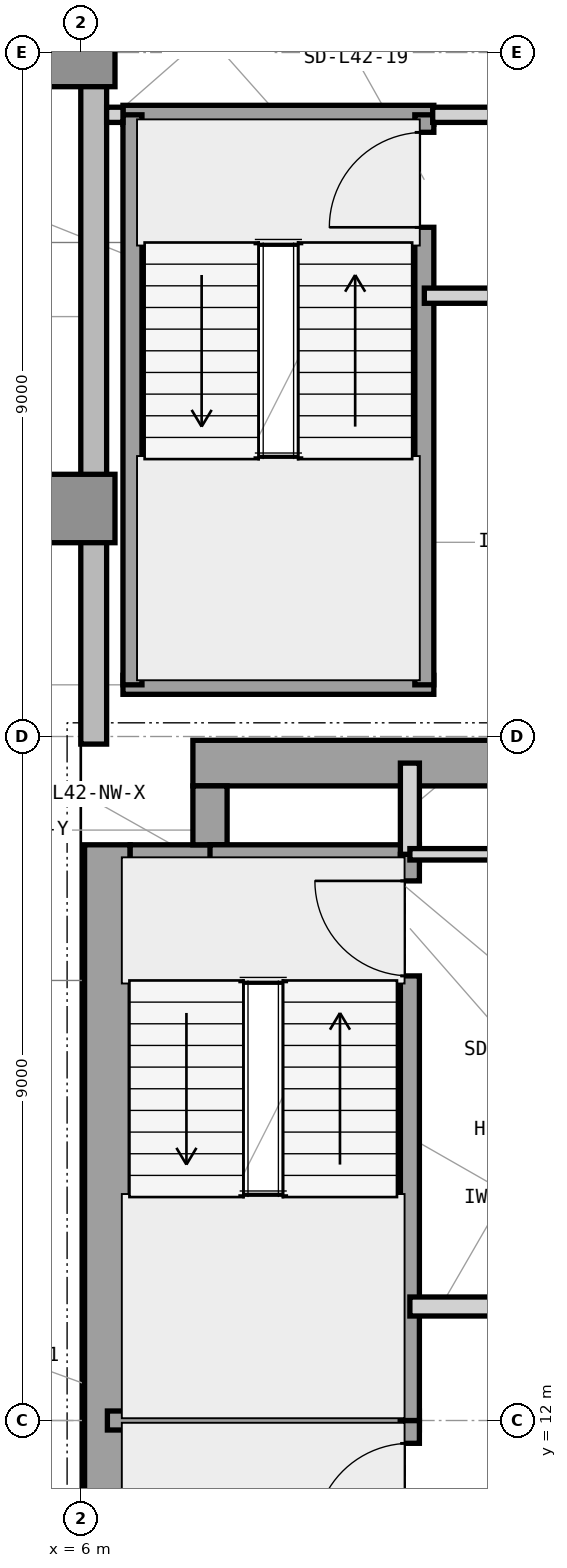
"""IFC4 building model, lengths in metres.
Left out: names, types, materials, properties, quantities, classifications, styles, units other than length and angle.
Written with IfcOpenShell. Run it as: python <this file> out.ifc"""

import sys

from ifc_helpers import new_model, si_unit, direction, frame, frame_2d, origin, origin_2d, place, context, subcontext, project, spatial, rectangle, extrude, element, fill, save


model = new_model("IFC4")
c1 = context("Model", 3, precision=1e-05, world=origin(), true_north=direction((0.0, 1.0)))
c2 = subcontext(c1, "Body", "Model", "MODEL_VIEW")
j1 = project(units=[si_unit("LENGTHUNIT", "METRE"), si_unit("PLANEANGLEUNIT", "RADIAN")], contexts=[c1])
p1 = place(None, origin())
s1 = spatial("IfcSite", under=j1, at=p1, CompositionType="ELEMENT")
p2 = place(p1, origin())
s2 = spatial("IfcBuilding", under=s1, at=p2, CompositionType="ELEMENT")
p3 = place(p2, frame((0.0, 0.0, 176.1)))
s3 = spatial("IfcBuildingStorey", under=s2, at=p3, CompositionType="ELEMENT", Elevation=176.1)
p4 = place(p3, frame((6.35, 4.425, 0.0), z_axis=(0.0, 0.0, 1.0), x_axis=(0.0, 1.0, 0.0)))
e1 = element("IfcWall", 1, at=p4, inside=s3, PredefinedType="SHEAR", context=c2, shape_type="SweptSolid", body=[
    extrude(rectangle(XDim=15.15, YDim=0.6, at=frame_2d((7.575, 0.0))), origin(), (0.0, 0.0, 1.0), 3.9),
])
p5 = place(p3, frame((7.475, 20.65, 0.0), z_axis=(0.0, 0.0, 1.0), x_axis=(1.0, 0.0, 0.0)))
e2 = element("IfcWall", 2, at=p5, inside=s3, PredefinedType="SHEAR", context=c2, shape_type="SweptSolid", body=[
    extrude(rectangle(XDim=12.325, YDim=0.6, at=frame_2d((6.163, 0.0))), origin(), (0.0, 0.0, 1.0), 3.9),
])
p6 = place(p3, frame((6.65, 19.35, 0.0), z_axis=(0.0, 0.0, 1.0), x_axis=(1.0, 0.0, 0.0)))
e3 = element("IfcWall", 3, at=p6, inside=s3, PredefinedType="SHEAR", context=c2, shape_type="SweptSolid", body=[
    extrude(rectangle(XDim=1.275, YDim=0.45, at=frame_2d((0.638, 0.0))), origin(), (0.0, 0.0, 1.0), 3.9),
])
p7 = place(p3, frame((7.7, 19.575, 0.0), z_axis=(0.0, 0.0, 1.0), x_axis=(0.0, 1.0, 0.0)))
e4 = element("IfcWall", 4, at=p7, inside=s3, PredefinedType="SHEAR", context=c2, shape_type="SweptSolid", body=[
    extrude(rectangle(XDim=0.775, YDim=0.45, at=frame_2d((0.388, 0.0))), origin(), (0.0, 0.0, 1.0), 3.9),
])
for number, where, z_axis, x_axis in (
    (5, (6.0, 24.0, 0.0), (0.0, 0.0, 1.0), (1.0, 0.0, 0.0)),
    (6, (6.0, 30.0, 0.0), (0.0, 0.0, 1.0), (1.0, 0.0, 0.0)),
):
    element("IfcColumn", number, at=place(p3, frame(where, z_axis=z_axis, x_axis=x_axis)), inside=s3, PredefinedType="COLUMN", context=c2, shape_type="SweptSolid", body=[
        extrude(rectangle(XDim=0.9, YDim=0.9, at=origin_2d()), origin(), (0.0, 0.0, 1.0), 3.9),
    ])
p8 = place(p3, frame((6.17, 43.4, 0.0), z_axis=(0.0, 0.0, 1.0), x_axis=(0.0, -1.0, 0.0)))
e7 = element("IfcWall", 7, at=p8, inside=s3, PredefinedType="STANDARD", context=c2, shape_type="SweptSolid", body=[
    extrude(rectangle(XDim=22.5, YDim=0.34, at=frame_2d((11.25, 0.0))), origin(), (0.0, 0.0, 1.0), 3.7),
])
p9 = place(p8, frame((10.1, 0.0, 0.9)))
e8 = element("IfcOpeningElement", 8, at=p9, cuts=e7, PredefinedType="OPENING", context=c2, shape_type="SweptSolid", body=[
    extrude(rectangle(XDim=2.3, YDim=2.2, at=frame_2d((1.15, 1.1))), frame((0.0, 0.18, 0.0), z_axis=(0.0, -1.0, 0.0), x_axis=(1.0, 0.0, 0.0)), (0.0, 0.0, 1.0), 0.36),
])
p10 = place(p8, frame((5.425, 0.0, 0.9)))
e9 = element("IfcOpeningElement", 9, at=p10, cuts=e7, PredefinedType="OPENING", context=c2, shape_type="SweptSolid", body=[
    extrude(rectangle(XDim=1.2, YDim=2.2, at=frame_2d((0.6, 1.1))), frame((0.0, 0.18, 0.0), z_axis=(0.0, -1.0, 0.0), x_axis=(1.0, 0.0, 0.0)), (0.0, 0.0, 1.0), 0.36),
])
p11 = place(p3, frame((6.35, 12.0, 0.0), z_axis=(0.0, 0.0, 1.0), x_axis=(1.0, 0.0, 0.0)))
e10 = element("IfcWall", 10, at=p11, inside=s3, PredefinedType="SHEAR", context=c2, shape_type="SweptSolid", body=[
    extrude(rectangle(XDim=4.105, YDim=0.25, at=frame_2d((2.052, 0.0))), origin(), (0.0, 0.0, 1.0), 3.9),
])
p12 = place(p3, frame((7.7, 19.45, 0.0), z_axis=(0.0, 0.0, 1.0), x_axis=(1.0, 0.0, 0.0)))
e11 = element("IfcWall", 11, at=p12, inside=s3, PredefinedType="SHEAR", context=c2, shape_type="SweptSolid", body=[
    extrude(rectangle(XDim=2.755, YDim=0.25, at=frame_2d((1.377, 0.0))), origin(), (0.0, 0.0, 1.0), 3.9),
])
p13 = place(p3, frame((10.33, 4.55, 0.0), z_axis=(0.0, 0.0, 1.0), x_axis=(0.0, 1.0, 0.0)))
e12 = element("IfcWall", 12, at=p13, inside=s3, PredefinedType="SHEAR", context=c2, shape_type="SweptSolid", body=[
    extrude(rectangle(XDim=7.45, YDim=0.25, at=frame_2d((3.725, 0.0))), origin(), (0.0, 0.0, 1.0), 3.9),
])
p14 = place(p13, frame((5.9, 0.0, 0.0)))
e13 = element("IfcOpeningElement", 13, at=p14, cuts=e12, PredefinedType="OPENING", context=c2, shape_type="SweptSolid", body=[
    extrude(rectangle(XDim=1.25, YDim=2.2, at=frame_2d((0.625, 1.1))), frame((0.0, 0.135, 0.0), z_axis=(0.0, -1.0, 0.0), x_axis=(1.0, 0.0, 0.0)), (0.0, 0.0, 1.0), 0.27),
])
p15 = place(p3, frame((10.33, 12.0, 0.0), z_axis=(0.0, 0.0, 1.0), x_axis=(0.0, 1.0, 0.0)))
e14 = element("IfcWall", 14, at=p15, inside=s3, PredefinedType="SHEAR", context=c2, shape_type="SweptSolid", body=[
    extrude(rectangle(XDim=7.45, YDim=0.25, at=frame_2d((3.725, 0.0))), origin(), (0.0, 0.0, 1.0), 3.9),
])
p16 = place(p15, frame((5.85, 0.0, 0.0)))
e15 = element("IfcOpeningElement", 15, at=p16, cuts=e14, PredefinedType="OPENING", context=c2, shape_type="SweptSolid", body=[
    extrude(rectangle(XDim=1.25, YDim=2.2, at=frame_2d((0.625, 1.1))), frame((0.0, 0.135, 0.0), z_axis=(0.0, -1.0, 0.0), x_axis=(1.0, 0.0, 0.0)), (0.0, 0.0, 1.0), 0.27),
])
p17 = place(p3, frame((10.33, 19.45, 0.0), z_axis=(0.0, 0.0, 1.0), x_axis=(0.0, 1.0, 0.0)))
e16 = element("IfcWall", 16, at=p17, inside=s3, PredefinedType="PARTITIONING", context=c2, shape_type="SweptSolid", body=[
    extrude(rectangle(XDim=1.2, YDim=0.25, at=frame_2d((0.6, 0.0))), origin(), (0.0, 0.0, 1.0), 3.073),
])
p18 = place(p3, frame((10.33, 13.5, 0.0), z_axis=(0.0, 0.0, 1.0), x_axis=(1.0, 0.0, 0.0)))
e17 = element("IfcWall", 17, at=p18, inside=s3, PredefinedType="PARTITIONING", context=c2, shape_type="SweptSolid", body=[
    extrude(rectangle(XDim=1.62, YDim=0.25, at=frame_2d((0.81, 0.0))), origin(), (0.0, 0.0, 1.0), 3.283),
])
p19 = place(p3, frame((10.33, 19.45, 0.0), z_axis=(0.0, 0.0, 1.0), x_axis=(1.0, 0.0, 0.0)))
e18 = element("IfcWall", 18, at=p19, inside=s3, PredefinedType="PARTITIONING", context=c2, shape_type="SweptSolid", body=[
    extrude(rectangle(XDim=3.82, YDim=0.15, at=frame_2d((1.91, 0.0))), origin(), (0.0, 0.0, 1.0), 3.69),
])
p20 = place(p19, frame((1.25, 0.0, 0.0)))
e19 = element("IfcOpeningElement", 19, at=p20, cuts=e18, PredefinedType="OPENING", context=c2, shape_type="SweptSolid", body=[
    extrude(rectangle(XDim=0.95, YDim=2.1, at=frame_2d((0.475, 1.05))), frame((0.0, 0.085, 0.0), z_axis=(0.0, -1.0, 0.0), x_axis=(1.0, 0.0, 0.0)), (0.0, 0.0, 1.0), 0.17),
])
for number, where, z_axis, x_axis in (
    (20, (6.555, 21.68, 0.0), (0.0, 0.0, 1.0), (1.0, 0.0, 0.0)),
    (21, (6.555, 29.18, 0.0), (0.0, 0.0, 1.0), (1.0, 0.0, 0.0)),
):
    element("IfcWall", number, at=place(p3, frame(where, z_axis=z_axis, x_axis=x_axis)), inside=s3, PredefinedType="SHEAR", context=c2, shape_type="SweptSolid", body=[
        extrude(rectangle(XDim=4.09, YDim=0.25, at=frame_2d((2.045, 0.0))), origin(), (0.0, 0.0, 1.0), 3.9),
    ])
p21 = place(p3, frame((6.68, 21.68, 0.0), z_axis=(0.0, 0.0, 1.0), x_axis=(0.0, 1.0, 0.0)))
e22 = element("IfcWall", 22, at=p21, inside=s3, PredefinedType="SHEAR", context=c2, shape_type="SweptSolid", body=[
    extrude(rectangle(XDim=7.5, YDim=0.25, at=frame_2d((3.75, 0.0))), origin(), (0.0, 0.0, 1.0), 3.9),
])
p22 = place(p3, frame((10.52, 21.68, 0.0), z_axis=(0.0, 0.0, 1.0), x_axis=(0.0, 1.0, 0.0)))
e23 = element("IfcWall", 23, at=p22, inside=s3, PredefinedType="SHEAR", context=c2, shape_type="SweptSolid", body=[
    extrude(rectangle(XDim=7.5, YDim=0.25, at=frame_2d((3.75, 0.0))), origin(), (0.0, 0.0, 1.0), 3.9),
])
p23 = place(p22, frame((6.02, 0.0, 0.0)))
e24 = element("IfcOpeningElement", 24, at=p23, cuts=e23, PredefinedType="OPENING", context=c2, shape_type="SweptSolid", body=[
    extrude(rectangle(XDim=1.25, YDim=2.2, at=frame_2d((0.625, 1.1))), frame((0.0, 0.135, 0.0), z_axis=(0.0, -1.0, 0.0), x_axis=(1.0, 0.0, 0.0)), (0.0, 0.0, 1.0), 0.27),
])
p24 = place(p3, frame((10.52, 26.8, 0.0), z_axis=(0.0, 0.0, 1.0), x_axis=(1.0, 0.0, 0.0)))
e25 = element("IfcWall", 25, at=p24, inside=s3, PredefinedType="PARTITIONING", context=c2, shape_type="SweptSolid", body=[
    extrude(rectangle(XDim=9.28, YDim=0.2, at=frame_2d((4.64, 0.0))), origin(), (0.0, 0.0, 1.0), 3.69),
])
p25 = place(p24, frame((4.0, 0.0, 0.0)))
e26 = element("IfcOpeningElement", 26, at=p25, cuts=e25, PredefinedType="OPENING", context=c2, shape_type="SweptSolid", body=[
    extrude(rectangle(XDim=1.0, YDim=2.15, at=frame_2d((0.5, 1.075))), frame((0.0, 0.11, 0.0), z_axis=(0.0, -1.0, 0.0), x_axis=(1.0, 0.0, 0.0)), (0.0, 0.0, 1.0), 0.22),
])
p26 = place(p3, frame((6.34, 29.18, 0.0), z_axis=(0.0, 0.0, 1.0), x_axis=(1.0, 0.0, 0.0)))
e27 = element("IfcWall", 27, at=p26, inside=s3, PredefinedType="PARTITIONING", context=c2, shape_type="SweptSolid", body=[
    extrude(rectangle(XDim=0.215, YDim=0.2, at=frame_2d((0.107, 0.0))), origin(), (0.0, 0.0, 1.0), 3.69),
])
p27 = place(p3, frame((10.63, 29.18, 0.0), z_axis=(0.0, 0.0, 1.0), x_axis=(1.0, 0.0, 0.0)))
e28 = element("IfcWall", 28, at=p27, inside=s3, PredefinedType="PARTITIONING", context=c2, shape_type="SweptSolid", body=[
    extrude(rectangle(XDim=10.17, YDim=0.2, at=frame_2d((5.085, 0.0))), origin(), (0.0, 0.0, 1.0), 3.69),
])
p28 = place(p14, origin())
e29 = element("IfcDoor", 29, at=p28, inside=s3, OperationType="SINGLE_SWING_LEFT", PredefinedType="DOOR", context=c2, shape_type="SweptSolid", body=[
    extrude(rectangle(XDim=1.25, YDim=2.2, at=frame_2d((0.625, 1.1))), frame((0.0, 0.025, 0.0), z_axis=(0.0, -1.0, 0.0), x_axis=(1.0, 0.0, 0.0)), (0.0, 0.0, 1.0), 0.05),
])
fill(e13, e29)
p29 = place(p16, origin())
e30 = element("IfcDoor", 30, at=p29, inside=s3, OperationType="SINGLE_SWING_RIGHT", PredefinedType="DOOR", context=c2, shape_type="SweptSolid", body=[
    extrude(rectangle(XDim=1.25, YDim=2.2, at=frame_2d((0.625, 1.1))), frame((0.0, 0.025, 0.0), z_axis=(0.0, -1.0, 0.0), x_axis=(1.0, 0.0, 0.0)), (0.0, 0.0, 1.0), 0.05),
])
fill(e15, e30)
p30 = place(p23, origin())
e31 = element("IfcDoor", 31, at=p30, inside=s3, OperationType="SINGLE_SWING_LEFT", PredefinedType="DOOR", context=c2, shape_type="SweptSolid", body=[
    extrude(rectangle(XDim=1.25, YDim=2.2, at=frame_2d((0.625, 1.1))), frame((0.0, 0.025, 0.0), z_axis=(0.0, -1.0, 0.0), x_axis=(1.0, 0.0, 0.0)), (0.0, 0.0, 1.0), 0.05),
])
fill(e24, e31)
save(model, sys.argv[1])
